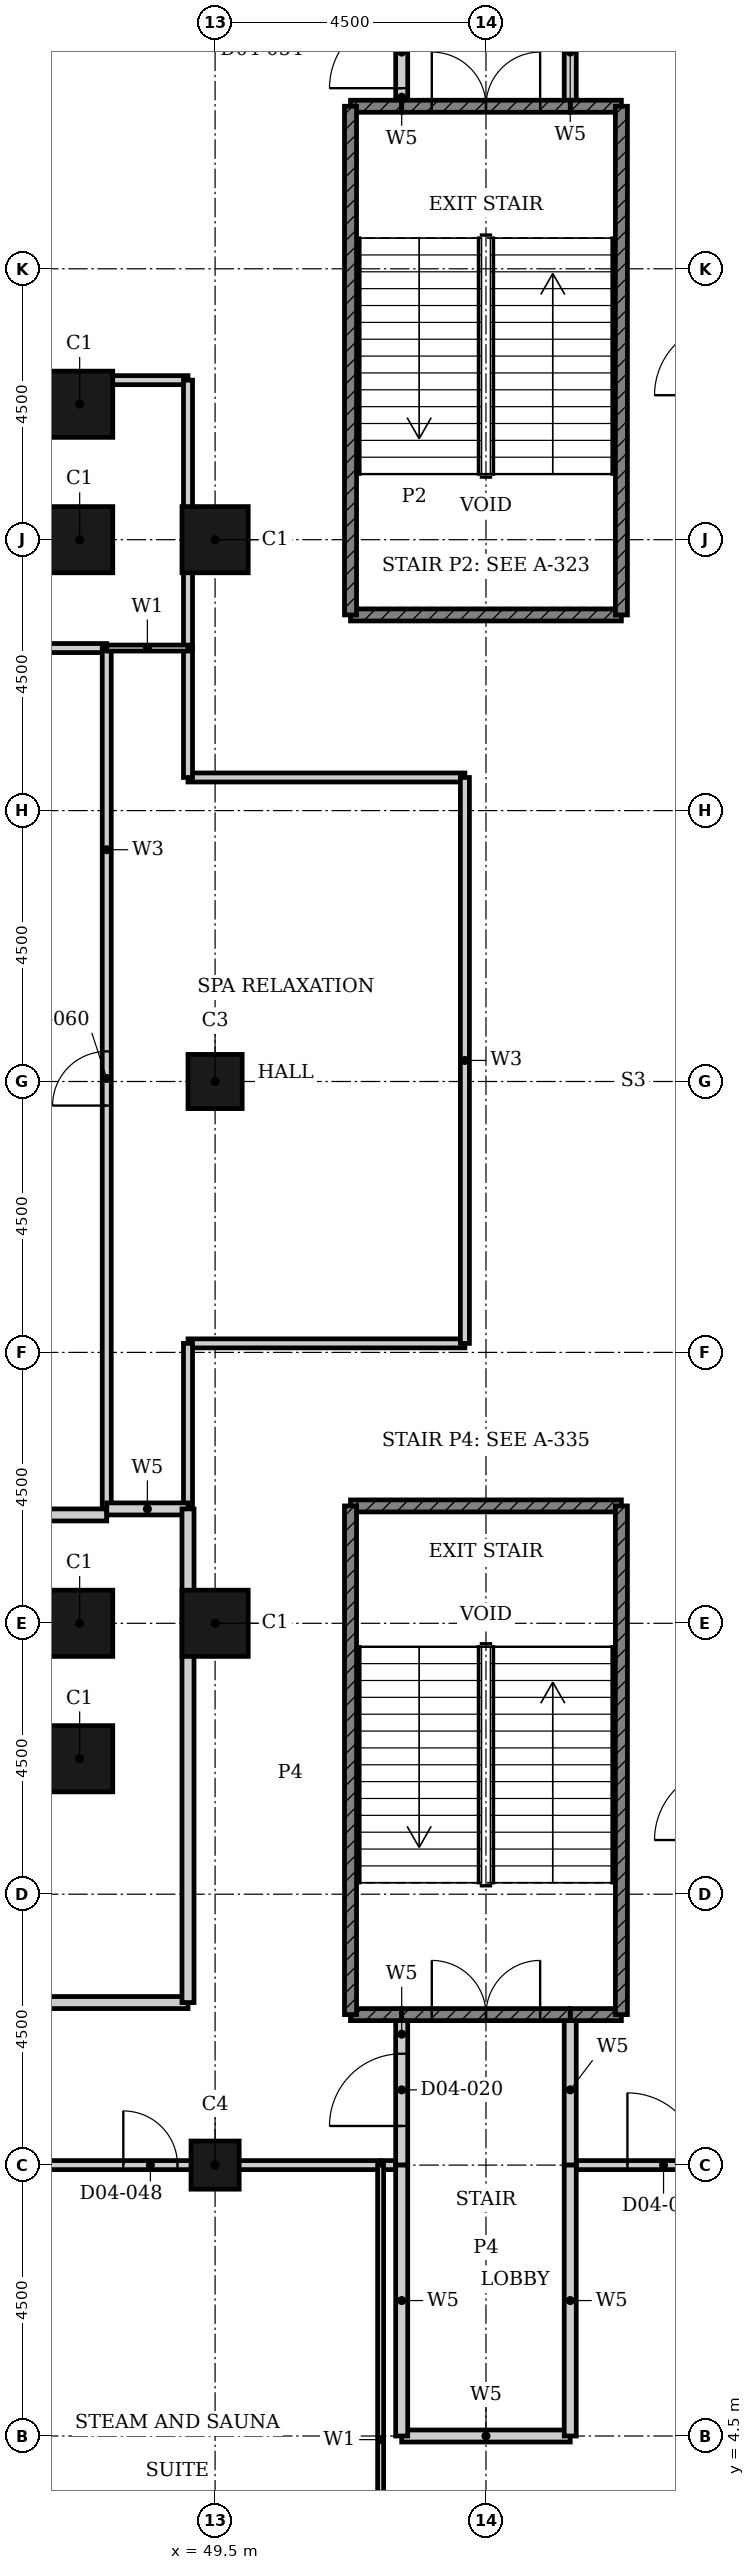
"""IFC4 building model, lengths in metres.
Left out: names, types, materials, properties, quantities, classifications, styles, units other than length and angle.
Written with IfcOpenShell. Run it as: python <this file> out.ifc"""

import sys

from ifc_helpers import new_model, si_unit, direction, frame, frame_2d, origin, origin_2d, place, context, subcontext, project, spatial, rectangle, hollow_rectangle, extrude, element, fill, save


model = new_model("IFC4")
c1 = context("Model", 3, precision=1e-05, world=origin(), true_north=direction((0.0, 1.0)))
c2 = subcontext(c1, "Body", "Model", "MODEL_VIEW")
j1 = project(units=[si_unit("LENGTHUNIT", "METRE"), si_unit("PLANEANGLEUNIT", "RADIAN")], contexts=[c1])
p1 = place(None, origin())
s1 = spatial("IfcSite", under=j1, at=p1, CompositionType="ELEMENT")
p2 = place(p1, origin())
s2 = spatial("IfcBuilding", under=s1, at=p2, CompositionType="ELEMENT")
p3 = place(p2, frame((0.0, 0.0, 24.0)))
s3 = spatial("IfcBuildingStorey", under=s2, at=p3, CompositionType="ELEMENT", Elevation=24.0)
for number, where, z_axis, x_axis in (
    (1, (47.25, 15.75, 0.0), (0.0, 0.0, 1.0), (1.0, 0.0, 0.0)),
    (2, (47.25, 18.0, 0.0), (0.0, 0.0, 1.0), (1.0, 0.0, 0.0)),
    (3, (49.5, 18.0, 0.0), (0.0, 0.0, 1.0), (1.0, 0.0, 0.0)),
    (4, (49.5, 36.0, 0.0), (0.0, 0.0, 1.0), (1.0, 0.0, 0.0)),
    (5, (47.25, 36.0, 0.0), (0.0, 0.0, 1.0), (1.0, 0.0, 0.0)),
    (6, (47.25, 38.25, 0.0), (0.0, 0.0, 1.0), (1.0, 0.0, 0.0)),
):
    element("IfcColumn", number, at=place(p3, frame(where, z_axis=z_axis, x_axis=x_axis)), inside=s3, PredefinedType="COLUMN", context=c2, shape_type="SweptSolid", body=[
        extrude(hollow_rectangle(XDim=1.1, YDim=1.1, WallThickness=0.036, at=origin_2d()), origin(), (0.0, 0.0, 1.0), 4.8),
    ])
p4 = place(p3, frame((49.5, 27.0, 0.0), z_axis=(0.0, 0.0, 1.0), x_axis=(1.0, 0.0, 0.0)))
e7 = element("IfcColumn", 7, at=p4, inside=s3, PredefinedType="COLUMN", context=c2, shape_type="SweptSolid", body=[
    extrude(hollow_rectangle(XDim=0.9, YDim=0.9, WallThickness=0.028, at=origin_2d()), origin(), (0.0, 0.0, 1.0), 4.8),
])
p5 = place(p3, frame((49.5, 9.0, 0.0), z_axis=(0.0, 0.0, 1.0), x_axis=(1.0, 0.0, 0.0)))
e8 = element("IfcColumn", 8, at=p5, inside=s3, PredefinedType="COLUMN", context=c2, shape_type="SweptSolid", body=[
    extrude(hollow_rectangle(XDim=0.8, YDim=0.8, WallThickness=0.025, at=origin_2d()), origin(), (0.0, 0.0, 1.0), 4.8),
])
for number, where, z_axis, x_axis in (
    (9, (49.05, 22.65, 0.0), (0.0, 0.0, 1.0), (1.0, 0.0, 0.0)),
    (10, (49.05, 32.05, 0.0), (0.0, 0.0, 1.0), (1.0, 0.0, 0.0)),
):
    element("IfcWall", number, at=place(p3, frame(where, z_axis=z_axis, x_axis=x_axis)), inside=s3, PredefinedType="PARTITIONING", context=c2, shape_type="SweptSolid", body=[
        extrude(rectangle(XDim=4.6, YDim=0.15, at=frame_2d((2.3, 0.0))), origin(), (0.0, 0.0, 1.0), 4.45),
    ])
p6 = place(p3, frame((35.6, 34.2, 0.0), z_axis=(0.0, 0.0, 1.0), x_axis=(1.0, 0.0, 0.0)))
e11 = element("IfcWall", 11, at=p6, inside=s3, PredefinedType="PARTITIONING", context=c2, shape_type="SweptSolid", body=[
    extrude(rectangle(XDim=12.1, YDim=0.15, at=frame_2d((6.05, 0.0))), origin(), (0.0, 0.0, 1.0), 4.45),
])
p7 = place(p3, frame((35.6, 38.65, 0.0), z_axis=(0.0, 0.0, 1.0), x_axis=(1.0, 0.0, 0.0)))
e12 = element("IfcWall", 12, at=p7, inside=s3, PredefinedType="PARTITIONING", context=c2, shape_type="SweptSolid", body=[
    extrude(rectangle(XDim=13.45, YDim=0.15, at=frame_2d((6.725, 0.0))), origin(), (0.0, 0.0, 1.0), 4.45),
])
p8 = place(p7, frame((6.125, 0.0, 0.0)))
e13 = element("IfcOpeningElement", 13, at=p8, cuts=e12, PredefinedType="OPENING", context=c2, shape_type="SweptSolid", body=[
    extrude(rectangle(XDim=1.2, YDim=2.4, at=frame_2d((0.6, 1.2))), frame((0.0, 0.085, 0.0), z_axis=(0.0, -1.0, 0.0), x_axis=(1.0, 0.0, 0.0)), (0.0, 0.0, 1.0), 0.17),
])
p9 = place(p3, frame((45.5, 9.0, 0.0), z_axis=(0.0, 0.0, 1.0), x_axis=(1.0, 0.0, 0.0)))
e14 = element("IfcWall", 14, at=p9, inside=s3, PredefinedType="PARTITIONING", context=c2, shape_type="SweptSolid", body=[
    extrude(rectangle(XDim=6.75, YDim=0.15, at=frame_2d((3.375, 0.0))), origin(), (0.0, 0.0, 1.0), 4.45),
])
p10 = place(p9, frame((2.475, 0.0, 0.0)))
e15 = element("IfcOpeningElement", 15, at=p10, cuts=e14, PredefinedType="OPENING", context=c2, shape_type="SweptSolid", body=[
    extrude(rectangle(XDim=0.9, YDim=2.1, at=frame_2d((0.45, 1.05))), frame((0.0, 0.085, 0.0), z_axis=(0.0, -1.0, 0.0), x_axis=(1.0, 0.0, 0.0)), (0.0, 0.0, 1.0), 0.17),
])
p11 = place(p3, frame((52.25, 9.0, 0.0), z_axis=(0.0, 0.0, 1.0), x_axis=(1.0, 0.0, 0.0)))
e16 = element("IfcWall", 16, at=p11, inside=s3, PredefinedType="PARTITIONING", context=c2, shape_type="SweptSolid", body=[
    extrude(rectangle(XDim=0.35, YDim=0.15, at=frame_2d((0.175, 0.0))), origin(), (0.0, 0.0, 1.0), 4.45),
])
p12 = place(p3, frame((55.4, 9.0, 0.0), z_axis=(0.0, 0.0, 1.0), x_axis=(1.0, 0.0, 0.0)))
e17 = element("IfcWall", 17, at=p12, inside=s3, PredefinedType="PARTITIONING", context=c2, shape_type="SweptSolid", body=[
    extrude(rectangle(XDim=3.1, YDim=0.15, at=frame_2d((1.55, 0.0))), origin(), (0.0, 0.0, 1.0), 4.45),
])
p13 = place(p12, frame((0.95, 0.0, 0.0)))
e18 = element("IfcOpeningElement", 18, at=p13, cuts=e17, PredefinedType="OPENING", context=c2, shape_type="SweptSolid", body=[
    extrude(rectangle(XDim=1.2, YDim=2.4, at=frame_2d((0.6, 1.2))), frame((0.0, 0.085, 0.0), z_axis=(0.0, -1.0, 0.0), x_axis=(1.0, 0.0, 0.0)), (0.0, 0.0, 1.0), 0.17),
])
p14 = place(p3, frame((47.7, 19.9, 0.0), z_axis=(0.0, 0.0, 1.0), x_axis=(0.0, 1.0, 0.0)))
e19 = element("IfcWall", 19, at=p14, inside=s3, PredefinedType="PARTITIONING", context=c2, shape_type="SweptSolid", body=[
    extrude(rectangle(XDim=14.3, YDim=0.15, at=frame_2d((7.15, 0.0))), origin(), (0.0, 0.0, 1.0), 4.45),
])
p15 = place(p14, frame((6.7, 0.0, 0.0)))
e20 = element("IfcOpeningElement", 20, at=p15, cuts=e19, PredefinedType="OPENING", context=c2, shape_type="SweptSolid", body=[
    extrude(rectangle(XDim=0.9, YDim=2.1, at=frame_2d((0.45, 1.05))), frame((0.0, 0.085, 0.0), z_axis=(0.0, -1.0, 0.0), x_axis=(1.0, 0.0, 0.0)), (0.0, 0.0, 1.0), 0.17),
])
p16 = place(p3, frame((49.05, 34.2, 0.0), z_axis=(0.0, 0.0, 1.0), x_axis=(0.0, 1.0, 0.0)))
e21 = element("IfcWall", 21, at=p16, inside=s3, PredefinedType="PARTITIONING", context=c2, shape_type="SweptSolid", body=[
    extrude(rectangle(XDim=4.45, YDim=0.15, at=frame_2d((2.225, 0.0))), origin(), (0.0, 0.0, 1.0), 4.45),
])
p17 = place(p3, frame((49.05, 19.9, 0.0), z_axis=(0.0, 0.0, 1.0), x_axis=(0.0, 1.0, 0.0)))
e22 = element("IfcWall", 22, at=p17, inside=s3, PredefinedType="PARTITIONING", context=c2, shape_type="SweptSolid", body=[
    extrude(rectangle(XDim=2.75, YDim=0.15, at=frame_2d((1.375, 0.0))), origin(), (0.0, 0.0, 1.0), 4.45),
])
p18 = place(p3, frame((49.05, 32.05, 0.0), z_axis=(0.0, 0.0, 1.0), x_axis=(0.0, 1.0, 0.0)))
e23 = element("IfcWall", 23, at=p18, inside=s3, PredefinedType="PARTITIONING", context=c2, shape_type="SweptSolid", body=[
    extrude(rectangle(XDim=2.15, YDim=0.15, at=frame_2d((1.075, 0.0))), origin(), (0.0, 0.0, 1.0), 4.45),
])
p19 = place(p3, frame((53.65, 22.65, 0.0), z_axis=(0.0, 0.0, 1.0), x_axis=(0.0, 1.0, 0.0)))
e24 = element("IfcWall", 24, at=p19, inside=s3, PredefinedType="PARTITIONING", context=c2, shape_type="SweptSolid", body=[
    extrude(rectangle(XDim=9.4, YDim=0.15, at=frame_2d((4.7, 0.0))), origin(), (0.0, 0.0, 1.0), 4.45),
])
p20 = place(p3, frame((47.7, 34.2, 0.0), z_axis=(0.0, 0.0, 1.0), x_axis=(1.0, 0.0, 0.0)))
e25 = element("IfcWall", 25, at=p20, inside=s3, PredefinedType="PARTITIONING", context=c2, shape_type="SweptSolid", body=[
    extrude(rectangle(XDim=1.35, YDim=0.1, at=frame_2d((0.675, 0.0))), origin(), (0.0, 0.0, 1.0), 4.45),
])
p21 = place(p3, frame((52.25, -0.12, 0.0), z_axis=(0.0, 0.0, 1.0), x_axis=(0.0, 1.0, 0.0)))
e26 = element("IfcWall", 26, at=p21, inside=s3, PredefinedType="PARTITIONING", context=c2, shape_type="SweptSolid", body=[
    extrude(rectangle(XDim=9.12, YDim=0.1, at=frame_2d((4.56, 0.0))), origin(), (0.0, 0.0, 1.0), 4.45),
])
p22 = place(p3, frame((40.5, 11.7, 0.0), z_axis=(0.0, 0.0, 1.0), x_axis=(1.0, 0.0, 0.0)))
e27 = element("IfcWall", 27, at=p22, inside=s3, PredefinedType="PARTITIONING", context=c2, shape_type="SweptSolid", body=[
    extrude(rectangle(XDim=8.55, YDim=0.2, at=frame_2d((4.275, 0.0))), origin(), (0.0, 0.0, 1.0), 4.45),
])
p23 = place(p22, frame((3.675, 0.0, 0.0)))
e28 = element("IfcOpeningElement", 28, at=p23, cuts=e27, PredefinedType="OPENING", context=c2, shape_type="SweptSolid", body=[
    extrude(rectangle(XDim=1.2, YDim=2.1, at=frame_2d((0.6, 1.05))), frame((0.0, 0.11, 0.0), z_axis=(0.0, -1.0, 0.0), x_axis=(1.0, 0.0, 0.0)), (0.0, 0.0, 1.0), 0.22),
])
p24 = place(p3, frame((40.5, 19.8, 0.0), z_axis=(0.0, 0.0, 1.0), x_axis=(1.0, 0.0, 0.0)))
e29 = element("IfcWall", 29, at=p24, inside=s3, PredefinedType="PARTITIONING", context=c2, shape_type="SweptSolid", body=[
    extrude(rectangle(XDim=7.2, YDim=0.2, at=frame_2d((3.6, 0.0))), origin(), (0.0, 0.0, 1.0), 4.45),
])
p25 = place(p3, frame((47.7, 19.9, 0.0), z_axis=(0.0, 0.0, 1.0), x_axis=(1.0, 0.0, 0.0)))
e30 = element("IfcWall", 30, at=p25, inside=s3, PredefinedType="PARTITIONING", context=c2, shape_type="SweptSolid", body=[
    extrude(rectangle(XDim=1.35, YDim=0.2, at=frame_2d((0.675, 0.0))), origin(), (0.0, 0.0, 1.0), 4.45),
])
p26 = place(p3, frame((52.6, 4.5, 0.0), z_axis=(0.0, 0.0, 1.0), x_axis=(1.0, 0.0, 0.0)))
e31 = element("IfcWall", 31, at=p26, inside=s3, PredefinedType="PARTITIONING", context=c2, shape_type="SweptSolid", body=[
    extrude(rectangle(XDim=2.8, YDim=0.2, at=frame_2d((1.4, 0.0))), origin(), (0.0, 0.0, 1.0), 4.45),
])
p27 = place(p3, frame((49.05, 11.7, 0.0), z_axis=(0.0, 0.0, 1.0), x_axis=(0.0, 1.0, 0.0)))
e32 = element("IfcWall", 32, at=p27, inside=s3, PredefinedType="PARTITIONING", context=c2, shape_type="SweptSolid", body=[
    extrude(rectangle(XDim=8.2, YDim=0.2, at=frame_2d((4.1, 0.0))), origin(), (0.0, 0.0, 1.0), 4.45),
])
p28 = place(p3, frame((52.6, 43.2, 0.0), z_axis=(0.0, 0.0, 1.0), x_axis=(0.0, 1.0, 0.0)))
e33 = element("IfcWall", 33, at=p28, inside=s3, PredefinedType="PARTITIONING", context=c2, shape_type="SweptSolid", body=[
    extrude(rectangle(XDim=1.8, YDim=0.2, at=frame_2d((0.9, 0.0))), origin(), (0.0, 0.0, 1.0), 4.45),
])
p29 = place(p28, frame((0.3, 0.0, 0.0)))
e34 = element("IfcOpeningElement", 34, at=p29, cuts=e33, PredefinedType="OPENING", context=c2, shape_type="SweptSolid", body=[
    extrude(rectangle(XDim=1.2, YDim=2.1, at=frame_2d((0.6, 1.05))), frame((0.0, 0.11, 0.0), z_axis=(0.0, -1.0, 0.0), x_axis=(1.0, 0.0, 0.0)), (0.0, 0.0, 1.0), 0.22),
])
p30 = place(p3, frame((52.6, 9.0, 0.0), z_axis=(0.0, 0.0, 1.0), x_axis=(0.0, 1.0, 0.0)))
e35 = element("IfcWall", 35, at=p30, inside=s3, PredefinedType="PARTITIONING", context=c2, shape_type="SweptSolid", body=[
    extrude(rectangle(XDim=2.5, YDim=0.2, at=frame_2d((1.25, 0.0))), origin(), (0.0, 0.0, 1.0), 4.45),
])
p31 = place(p30, frame((0.65, 0.0, 0.0)))
e36 = element("IfcOpeningElement", 36, at=p31, cuts=e35, PredefinedType="OPENING", context=c2, shape_type="SweptSolid", body=[
    extrude(rectangle(XDim=1.2, YDim=2.1, at=frame_2d((0.6, 1.05))), frame((0.0, 0.11, 0.0), z_axis=(0.0, -1.0, 0.0), x_axis=(1.0, 0.0, 0.0)), (0.0, 0.0, 1.0), 0.22),
])
p32 = place(p3, frame((52.6, 4.5, 0.0), z_axis=(0.0, 0.0, 1.0), x_axis=(0.0, 1.0, 0.0)))
e37 = element("IfcWall", 37, at=p32, inside=s3, PredefinedType="PARTITIONING", context=c2, shape_type="SweptSolid", body=[
    extrude(rectangle(XDim=4.5, YDim=0.2, at=frame_2d((2.25, 0.0))), origin(), (0.0, 0.0, 1.0), 4.45),
])
p33 = place(p3, frame((55.4, 43.2, 0.0), z_axis=(0.0, 0.0, 1.0), x_axis=(0.0, 1.0, 0.0)))
e38 = element("IfcWall", 38, at=p33, inside=s3, PredefinedType="PARTITIONING", context=c2, shape_type="SweptSolid", body=[
    extrude(rectangle(XDim=1.8, YDim=0.2, at=frame_2d((0.9, 0.0))), origin(), (0.0, 0.0, 1.0), 4.45),
])
p34 = place(p3, frame((55.4, 9.0, 0.0), z_axis=(0.0, 0.0, 1.0), x_axis=(0.0, 1.0, 0.0)))
e39 = element("IfcWall", 39, at=p34, inside=s3, PredefinedType="PARTITIONING", context=c2, shape_type="SweptSolid", body=[
    extrude(rectangle(XDim=2.5, YDim=0.2, at=frame_2d((1.25, 0.0))), origin(), (0.0, 0.0, 1.0), 4.45),
])
p35 = place(p3, frame((55.4, 4.5, 0.0), z_axis=(0.0, 0.0, 1.0), x_axis=(0.0, 1.0, 0.0)))
e40 = element("IfcWall", 40, at=p35, inside=s3, PredefinedType="PARTITIONING", context=c2, shape_type="SweptSolid", body=[
    extrude(rectangle(XDim=4.5, YDim=0.2, at=frame_2d((2.25, 0.0))), origin(), (0.0, 0.0, 1.0), 4.45),
])
for number, where, z_axis, x_axis in (
    (41, (51.75, 11.5, 0.0), (0.0, 0.0, 1.0), (1.0, 0.0, 0.0)),
    (42, (55.4, 11.5, 0.0), (0.0, 0.0, 1.0), (1.0, 0.0, 0.0)),
):
    element("IfcWall", number, at=place(p3, frame(where, z_axis=z_axis, x_axis=x_axis)), inside=s3, PredefinedType="SHEAR", context=c2, shape_type="SweptSolid", body=[
        extrude(rectangle(XDim=0.85, YDim=0.2, at=frame_2d((0.425, 0.0))), origin(), (0.0, 0.0, 1.0), 4.45),
    ])
p36 = place(p3, frame((52.6, 11.5, 0.0), z_axis=(0.0, 0.0, 1.0), x_axis=(1.0, 0.0, 0.0)))
e43 = element("IfcWall", 43, at=p36, inside=s3, PredefinedType="SHEAR", context=c2, shape_type="SweptSolid", body=[
    extrude(rectangle(XDim=2.8, YDim=0.2, at=frame_2d((1.4, 0.0))), origin(), (0.0, 0.0, 1.0), 4.45),
])
p37 = place(p36, frame((0.5, 0.0, 0.0)))
e44 = element("IfcOpeningElement", 44, at=p37, cuts=e43, PredefinedType="OPENING", context=c2, shape_type="SweptSolid", body=[
    extrude(rectangle(XDim=1.8, YDim=2.1, at=frame_2d((0.9, 1.05))), frame((0.0, 0.11, 0.0), z_axis=(0.0, -1.0, 0.0), x_axis=(1.0, 0.0, 0.0)), (0.0, 0.0, 1.0), 0.22),
])
for number, where, z_axis, x_axis in (
    (45, (51.75, 19.95, 0.0), (0.0, 0.0, 1.0), (1.0, 0.0, 0.0)),
    (46, (51.75, 34.75, 0.0), (0.0, 0.0, 1.0), (1.0, 0.0, 0.0)),
):
    element("IfcWall", number, at=place(p3, frame(where, z_axis=z_axis, x_axis=x_axis)), inside=s3, PredefinedType="SHEAR", context=c2, shape_type="SweptSolid", body=[
        extrude(rectangle(XDim=4.5, YDim=0.2, at=frame_2d((2.25, 0.0))), origin(), (0.0, 0.0, 1.0), 4.45),
    ])
for number, where, z_axis, x_axis in (
    (47, (51.75, 43.2, 0.0), (0.0, 0.0, 1.0), (1.0, 0.0, 0.0)),
    (48, (55.4, 43.2, 0.0), (0.0, 0.0, 1.0), (1.0, 0.0, 0.0)),
):
    element("IfcWall", number, at=place(p3, frame(where, z_axis=z_axis, x_axis=x_axis)), inside=s3, PredefinedType="SHEAR", context=c2, shape_type="SweptSolid", body=[
        extrude(rectangle(XDim=0.85, YDim=0.2, at=frame_2d((0.425, 0.0))), origin(), (0.0, 0.0, 1.0), 4.45),
    ])
p38 = place(p3, frame((52.6, 43.2, 0.0), z_axis=(0.0, 0.0, 1.0), x_axis=(1.0, 0.0, 0.0)))
e49 = element("IfcWall", 49, at=p38, inside=s3, PredefinedType="SHEAR", context=c2, shape_type="SweptSolid", body=[
    extrude(rectangle(XDim=2.8, YDim=0.2, at=frame_2d((1.4, 0.0))), origin(), (0.0, 0.0, 1.0), 4.45),
])
p39 = place(p38, frame((0.5, 0.0, 0.0)))
e50 = element("IfcOpeningElement", 50, at=p39, cuts=e49, PredefinedType="OPENING", context=c2, shape_type="SweptSolid", body=[
    extrude(rectangle(XDim=1.8, YDim=2.1, at=frame_2d((0.9, 1.05))), frame((0.0, 0.11, 0.0), z_axis=(0.0, -1.0, 0.0), x_axis=(1.0, 0.0, 0.0)), (0.0, 0.0, 1.0), 0.22),
])
for number, where, z_axis, x_axis in (
    (51, (51.75, 34.75, 0.0), (0.0, 0.0, 1.0), (0.0, 1.0, 0.0)),
    (52, (51.75, 11.5, 0.0), (0.0, 0.0, 1.0), (0.0, 1.0, 0.0)),
    (53, (56.25, 34.75, 0.0), (0.0, 0.0, 1.0), (0.0, 1.0, 0.0)),
    (54, (56.25, 11.5, 0.0), (0.0, 0.0, 1.0), (0.0, 1.0, 0.0)),
):
    element("IfcWall", number, at=place(p3, frame(where, z_axis=z_axis, x_axis=x_axis)), inside=s3, PredefinedType="SHEAR", context=c2, shape_type="SweptSolid", body=[
        extrude(rectangle(XDim=8.45, YDim=0.2, at=frame_2d((4.225, 0.0))), origin(), (0.0, 0.0, 1.0), 4.45),
    ])
p40 = place(p29, origin())
e55 = element("IfcDoor", 55, at=p40, inside=s3, OperationType="SINGLE_SWING_LEFT", PredefinedType="DOOR", context=c2, shape_type="SweptSolid", body=[
    extrude(rectangle(XDim=1.2, YDim=2.1, at=frame_2d((0.6, 1.05))), frame((0.0, 0.025, 0.0), z_axis=(0.0, -1.0, 0.0), x_axis=(1.0, 0.0, 0.0)), (0.0, 0.0, 1.0), 0.05),
])
fill(e34, e55)
p41 = place(p39, origin())
e56 = element("IfcDoor", 56, at=p41, inside=s3, OperationType="DOUBLE_DOOR_SINGLE_SWING", PredefinedType="DOOR", context=c2, shape_type="SweptSolid", body=[
    extrude(rectangle(XDim=1.8, YDim=2.1, at=frame_2d((0.9, 1.05))), frame((0.0, 0.025, 0.0), z_axis=(0.0, -1.0, 0.0), x_axis=(1.0, 0.0, 0.0)), (0.0, 0.0, 1.0), 0.05),
])
fill(e50, e56)
p42 = place(p31, origin())
e57 = element("IfcDoor", 57, at=p42, inside=s3, OperationType="SINGLE_SWING_RIGHT", PredefinedType="DOOR", context=c2, shape_type="SweptSolid", body=[
    extrude(rectangle(XDim=1.2, YDim=2.1, at=frame_2d((0.6, 1.05))), frame((0.0, 0.025, 0.0), z_axis=(0.0, -1.0, 0.0), x_axis=(1.0, 0.0, 0.0)), (0.0, 0.0, 1.0), 0.05),
])
fill(e36, e57)
p43 = place(p37, origin())
e58 = element("IfcDoor", 58, at=p43, inside=s3, OperationType="DOUBLE_DOOR_SINGLE_SWING", PredefinedType="DOOR", context=c2, shape_type="SweptSolid", body=[
    extrude(rectangle(XDim=1.8, YDim=2.1, at=frame_2d((0.9, 1.05))), frame((0.0, 0.025, 0.0), z_axis=(0.0, -1.0, 0.0), x_axis=(1.0, 0.0, 0.0)), (0.0, 0.0, 1.0), 0.05),
])
fill(e44, e58)
p44 = place(p10, origin())
e59 = element("IfcDoor", 59, at=p44, inside=s3, OperationType="SINGLE_SWING_LEFT", PredefinedType="DOOR", context=c2, shape_type="SweptSolid", body=[
    extrude(rectangle(XDim=0.9, YDim=2.1, at=frame_2d((0.45, 1.05))), frame((0.0, 0.025, 0.0), z_axis=(0.0, -1.0, 0.0), x_axis=(1.0, 0.0, 0.0)), (0.0, 0.0, 1.0), 0.05),
])
fill(e15, e59)
p45 = place(p13, origin())
e60 = element("IfcDoor", 60, at=p45, inside=s3, OperationType="SINGLE_SWING_LEFT", PredefinedType="DOOR", context=c2, shape_type="SweptSolid", body=[
    extrude(rectangle(XDim=1.2, YDim=2.4, at=frame_2d((0.6, 1.2))), frame((0.0, 0.025, 0.0), z_axis=(0.0, -1.0, 0.0), x_axis=(1.0, 0.0, 0.0)), (0.0, 0.0, 1.0), 0.05),
])
fill(e18, e60)
p46 = place(p15, origin())
e61 = element("IfcDoor", 61, at=p46, inside=s3, OperationType="SINGLE_SWING_RIGHT", PredefinedType="DOOR", context=c2, shape_type="SweptSolid", body=[
    extrude(rectangle(XDim=0.9, YDim=2.1, at=frame_2d((0.45, 1.05))), frame((0.0, 0.025, 0.0), z_axis=(0.0, -1.0, 0.0), x_axis=(1.0, 0.0, 0.0)), (0.0, 0.0, 1.0), 0.05),
])
fill(e20, e61)
save(model, sys.argv[1])
